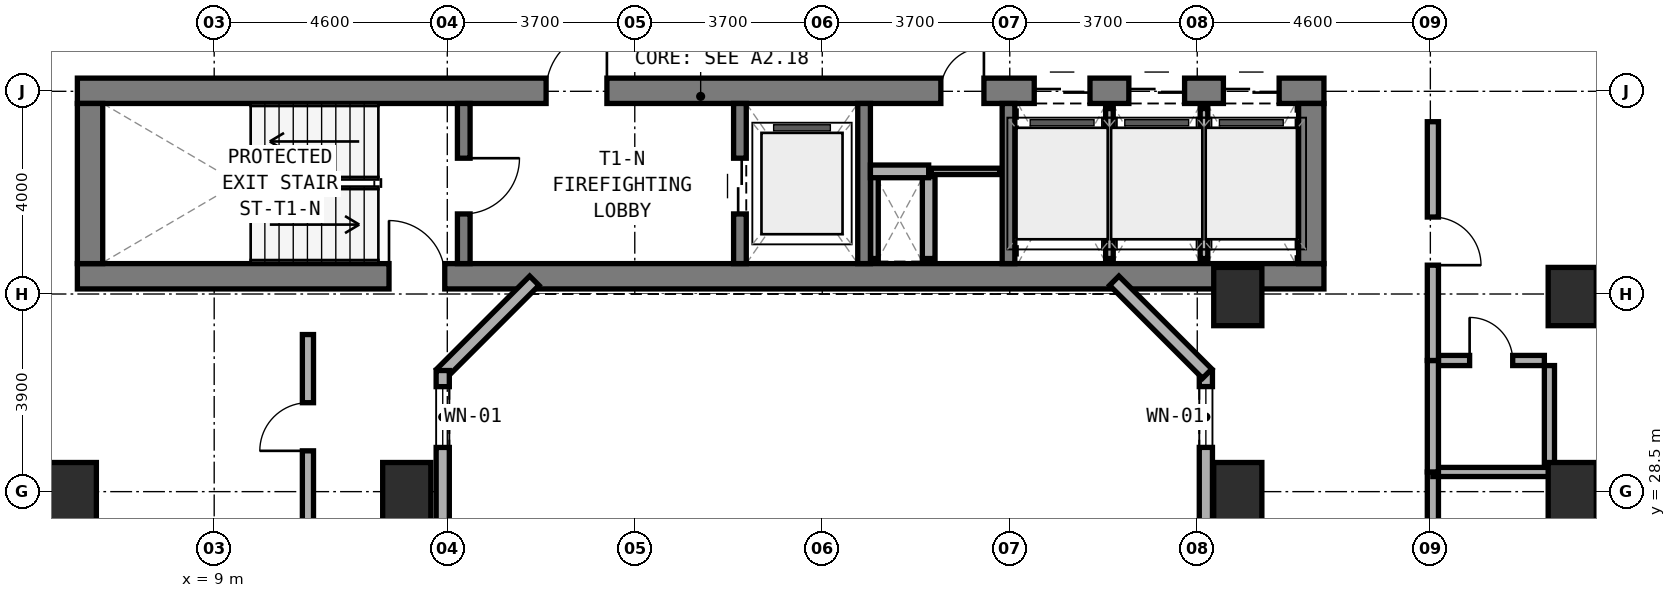
"""IFC4 building model, lengths in metres.
Left out: names, types, materials, properties, quantities, classifications, styles, units other than length and angle.
Written with IfcOpenShell. Run it as: python <this file> out.ifc"""

import sys

from ifc_helpers import new_model, si_unit, direction, frame, frame_2d, origin, origin_2d, place, context, subcontext, project, spatial, rectangle, extrude, element, fill, save


model = new_model("IFC4")
c1 = context("Model", 3, precision=1e-05, world=origin(), true_north=direction((0.0, 1.0)))
c2 = subcontext(c1, "Body", "Model", "MODEL_VIEW")
j1 = project(units=[si_unit("LENGTHUNIT", "METRE"), si_unit("PLANEANGLEUNIT", "RADIAN")], contexts=[c1])
p1 = place(None, origin())
s1 = spatial("IfcSite", under=j1, at=p1, CompositionType="ELEMENT")
p2 = place(p1, origin())
s2 = spatial("IfcBuilding", under=s1, at=p2, CompositionType="ELEMENT")
p3 = place(p2, frame((0.0, 0.0, 73.0)))
s3 = spatial("IfcBuildingStorey", under=s2, at=p3, CompositionType="ELEMENT", Elevation=73.0)
p4 = place(p3, frame((6.3, 32.75, 0.0), z_axis=(0.0, 0.0, 1.0), x_axis=(1.0, 0.0, 0.0)))
e1 = element("IfcWall", 1, at=p4, inside=s3, PredefinedType="SHEAR", context=c2, shape_type="SweptSolid", body=[
    extrude(rectangle(XDim=24.6, YDim=0.5, at=frame_2d((12.3, 0.0))), origin(), (0.0, 0.0, 1.0), 3.5),
])
p5 = place(p4, frame((6.15, 0.0, 0.0)))
e2 = element("IfcOpeningElement", 2, at=p5, cuts=e1, PredefinedType="OPENING", context=c2, shape_type="SweptSolid", body=[
    extrude(rectangle(XDim=1.1, YDim=2.15, at=frame_2d((0.55, 1.075))), frame((0.0, 0.26, 0.0), z_axis=(0.0, -1.0, 0.0), x_axis=(1.0, 0.0, 0.0)), (0.0, 0.0, 1.0), 0.52),
])
p6 = place(p3, frame((6.3, 36.41, 0.0), z_axis=(0.0, 0.0, 1.0), x_axis=(1.0, 0.0, 0.0)))
e3 = element("IfcWall", 3, at=p6, inside=s3, PredefinedType="SHEAR", context=c2, shape_type="SweptSolid", body=[
    extrude(rectangle(XDim=24.6, YDim=0.5, at=frame_2d((12.3, 0.0))), origin(), (0.0, 0.0, 1.0), 3.5),
])
p7 = place(p6, frame((9.25, 0.0, 0.0)))
e4 = element("IfcOpeningElement", 4, at=p7, cuts=e3, PredefinedType="OPENING", context=c2, shape_type="SweptSolid", body=[
    extrude(rectangle(XDim=1.2, YDim=2.15, at=frame_2d((0.6, 1.075))), frame((0.0, 0.26, 0.0), z_axis=(0.0, -1.0, 0.0), x_axis=(1.0, 0.0, 0.0)), (0.0, 0.0, 1.0), 0.52),
])
p8 = place(p6, frame((17.04, 0.0, 0.0)))
e5 = element("IfcOpeningElement", 5, at=p8, cuts=e3, PredefinedType="OPENING", context=c2, shape_type="SweptSolid", body=[
    extrude(rectangle(XDim=0.85, YDim=2.1, at=frame_2d((0.425, 1.05))), frame((0.0, 0.26, 0.0), z_axis=(0.0, -1.0, 0.0), x_axis=(1.0, 0.0, 0.0)), (0.0, 0.0, 1.0), 0.52),
])
p9 = place(p6, frame((18.883, 0.0, 0.0)))
e6 = element("IfcOpeningElement", 6, at=p9, cuts=e3, PredefinedType="OPENING", context=c2, shape_type="SweptSolid", body=[
    extrude(rectangle(XDim=1.1, YDim=2.15, at=frame_2d((0.55, 1.075))), frame((0.0, 0.26, 0.0), z_axis=(0.0, -1.0, 0.0), x_axis=(1.0, 0.0, 0.0)), (0.0, 0.0, 1.0), 0.52),
])
p10 = place(p6, frame((20.75, 0.0, 0.0)))
e7 = element("IfcOpeningElement", 7, at=p10, cuts=e3, PredefinedType="OPENING", context=c2, shape_type="SweptSolid", body=[
    extrude(rectangle(XDim=1.1, YDim=2.15, at=frame_2d((0.55, 1.075))), frame((0.0, 0.26, 0.0), z_axis=(0.0, -1.0, 0.0), x_axis=(1.0, 0.0, 0.0)), (0.0, 0.0, 1.0), 0.52),
])
p11 = place(p6, frame((22.616, 0.0, 0.0)))
e8 = element("IfcOpeningElement", 8, at=p11, cuts=e3, PredefinedType="OPENING", context=c2, shape_type="SweptSolid", body=[
    extrude(rectangle(XDim=1.1, YDim=2.15, at=frame_2d((0.55, 1.075))), frame((0.0, 0.26, 0.0), z_axis=(0.0, -1.0, 0.0), x_axis=(1.0, 0.0, 0.0)), (0.0, 0.0, 1.0), 0.52),
])
for number, where, z_axis, x_axis in (
    (9, (6.55, 33.0, 0.0), (0.0, 0.0, 1.0), (0.0, 1.0, 0.0)),
    (10, (30.65, 33.0, 0.0), (0.0, 0.0, 1.0), (0.0, 1.0, 0.0)),
):
    element("IfcWall", number, at=place(p3, frame(where, z_axis=z_axis, x_axis=x_axis)), inside=s3, PredefinedType="SHEAR", context=c2, shape_type="SweptSolid", body=[
        extrude(rectangle(XDim=3.16, YDim=0.5, at=frame_2d((1.58, 0.0))), origin(), (0.0, 0.0, 1.0), 3.5),
    ])
p12 = place(p3, frame((13.925, 33.0, 0.0), z_axis=(0.0, 0.0, 1.0), x_axis=(0.0, 1.0, 0.0)))
e11 = element("IfcWall", 11, at=p12, inside=s3, PredefinedType="STANDARD", context=c2, shape_type="SweptSolid", body=[
    extrude(rectangle(XDim=3.16, YDim=0.25, at=frame_2d((1.58, 0.0))), origin(), (0.0, 0.0, 1.0), 3.22),
])
p13 = place(p12, frame((0.98, 0.0, 0.0)))
e12 = element("IfcOpeningElement", 12, at=p13, cuts=e11, PredefinedType="OPENING", context=c2, shape_type="SweptSolid", body=[
    extrude(rectangle(XDim=1.1, YDim=2.15, at=frame_2d((0.55, 1.075))), frame((0.0, 0.135, 0.0), z_axis=(0.0, -1.0, 0.0), x_axis=(1.0, 0.0, 0.0)), (0.0, 0.0, 1.0), 0.27),
])
p14 = place(p3, frame((19.375, 33.0, 0.0), z_axis=(0.0, 0.0, 1.0), x_axis=(0.0, 1.0, 0.0)))
e13 = element("IfcWall", 13, at=p14, inside=s3, PredefinedType="STANDARD", context=c2, shape_type="SweptSolid", body=[
    extrude(rectangle(XDim=3.16, YDim=0.25, at=frame_2d((1.58, 0.0))), origin(), (0.0, 0.0, 1.0), 3.22),
])
p15 = place(p14, frame((0.98, 0.0, 0.0)))
e14 = element("IfcOpeningElement", 14, at=p15, cuts=e13, PredefinedType="OPENING", context=c2, shape_type="SweptSolid", body=[
    extrude(rectangle(XDim=1.1, YDim=2.15, at=frame_2d((0.55, 1.075))), frame((0.0, 0.135, 0.0), z_axis=(0.0, -1.0, 0.0), x_axis=(1.0, 0.0, 0.0)), (0.0, 0.0, 1.0), 0.27),
])
for number, where, z_axis, x_axis in (
    (15, (21.825, 33.0, 0.0), (0.0, 0.0, 1.0), (0.0, 1.0, 0.0)),
    (16, (24.675, 33.0, 0.0), (0.0, 0.0, 1.0), (0.0, 1.0, 0.0)),
):
    element("IfcWall", number, at=place(p3, frame(where, z_axis=z_axis, x_axis=x_axis)), inside=s3, PredefinedType="STANDARD", context=c2, shape_type="SweptSolid", body=[
        extrude(rectangle(XDim=3.16, YDim=0.25, at=frame_2d((1.58, 0.0))), origin(), (0.0, 0.0, 1.0), 3.22),
    ])
for number, where, z_axis, x_axis in (
    (17, (6.2, 28.5, 0.0), (0.0, 0.0, 1.0), (1.0, 0.0, 0.0)),
    (18, (35.8, 28.5, 0.0), (0.0, 0.0, 1.0), (1.0, 0.0, 0.0)),
    (19, (35.8, 32.35, 0.0), (0.0, 0.0, 1.0), (1.0, 0.0, 0.0)),
    (20, (12.8, 28.5, 0.0), (0.0, 0.0, 1.0), (1.0, 0.0, 0.0)),
    (21, (29.2, 32.35, 0.0), (0.0, 0.0, 1.0), (1.0, 0.0, 0.0)),
    (22, (29.2, 28.5, 0.0), (0.0, 0.0, 1.0), (1.0, 0.0, 0.0)),
):
    element("IfcColumn", number, at=place(p3, frame(where, z_axis=z_axis, x_axis=x_axis)), inside=s3, PredefinedType="COLUMN", context=c2, shape_type="SweptSolid", body=[
        extrude(rectangle(XDim=0.95, YDim=1.15, at=origin_2d()), origin(), (0.0, 0.0, 1.0), 3.5),
    ])
p16 = place(p3, frame((28.57, 19.11, 0.0), z_axis=(0.0, 0.0, 1.0), x_axis=(0.0, 1.0, 0.0)))
e23 = element("IfcWall", 23, at=p16, inside=s3, PredefinedType="STANDARD", context=c2, shape_type="SweptSolid", body=[
    extrude(rectangle(XDim=11.78, YDim=0.26, at=frame_2d((5.89, 0.0))), origin(), (0.0, 0.0, 1.0), 3.22),
])
p17 = place(p16, frame((0.318, 0.0, 0.85)))
e24 = element("IfcOpeningElement", 24, at=p17, cuts=e23, PredefinedType="OPENING", context=c2, shape_type="SweptSolid", body=[
    extrude(rectangle(XDim=1.2, YDim=1.5, at=frame_2d((0.6, 0.75))), frame((0.0, 0.14, 0.0), z_axis=(0.0, -1.0, 0.0), x_axis=(1.0, 0.0, 0.0)), (0.0, 0.0, 1.0), 0.28),
])
p18 = place(p16, frame((4.99, 0.0, 0.85)))
e25 = element("IfcOpeningElement", 25, at=p18, cuts=e23, PredefinedType="OPENING", context=c2, shape_type="SweptSolid", body=[
    extrude(rectangle(XDim=1.8, YDim=1.5, at=frame_2d((0.9, 0.75))), frame((0.0, 0.14, 0.0), z_axis=(0.0, -1.0, 0.0), x_axis=(1.0, 0.0, 0.0)), (0.0, 0.0, 1.0), 0.28),
])
p19 = place(p16, frame((10.263, 0.0, 0.85)))
e26 = element("IfcOpeningElement", 26, at=p19, cuts=e23, PredefinedType="OPENING", context=c2, shape_type="SweptSolid", body=[
    extrude(rectangle(XDim=1.2, YDim=1.5, at=frame_2d((0.6, 0.75))), frame((0.0, 0.14, 0.0), z_axis=(0.0, -1.0, 0.0), x_axis=(1.0, 0.0, 0.0)), (0.0, 0.0, 1.0), 0.28),
])
p20 = place(p3, frame((28.596, 30.828, 0.0), z_axis=(0.0, 0.0, 1.0), x_axis=(-0.707059717605, 0.707153841636, 0.0)))
e27 = element("IfcWall", 27, at=p20, inside=s3, PredefinedType="STANDARD", context=c2, shape_type="SweptSolid", body=[
    extrude(rectangle(XDim=2.594, YDim=0.26, at=frame_2d((1.297, 0.0))), origin(), (0.0, 0.0, 1.0), 3.22),
])
p21 = place(p3, frame((15.318, 32.662, 0.0), z_axis=(0.0, 0.0, 1.0), x_axis=(-0.707106781187, -0.707106781187, 0.0)))
e28 = element("IfcWall", 28, at=p21, inside=s3, PredefinedType="STANDARD", context=c2, shape_type="SweptSolid", body=[
    extrude(rectangle(XDim=2.594, YDim=0.26, at=frame_2d((1.297, 0.0))), origin(), (0.0, 0.0, 1.0), 3.22),
])
p22 = place(p3, frame((13.51, 30.89, 0.0), z_axis=(0.0, 0.0, 1.0), x_axis=(0.0, -1.0, 0.0)))
e29 = element("IfcWall", 29, at=p22, inside=s3, PredefinedType="STANDARD", context=c2, shape_type="SweptSolid", body=[
    extrude(rectangle(XDim=11.78, YDim=0.26, at=frame_2d((5.89, 0.0))), origin(), (0.0, 0.0, 1.0), 3.22),
])
p23 = place(p22, frame((0.318, 0.0, 0.85)))
e30 = element("IfcOpeningElement", 30, at=p23, cuts=e29, PredefinedType="OPENING", context=c2, shape_type="SweptSolid", body=[
    extrude(rectangle(XDim=1.2, YDim=1.5, at=frame_2d((0.6, 0.75))), frame((0.0, 0.14, 0.0), z_axis=(0.0, -1.0, 0.0), x_axis=(1.0, 0.0, 0.0)), (0.0, 0.0, 1.0), 0.28),
])
p24 = place(p22, frame((4.99, 0.0, 0.85)))
e31 = element("IfcOpeningElement", 31, at=p24, cuts=e29, PredefinedType="OPENING", context=c2, shape_type="SweptSolid", body=[
    extrude(rectangle(XDim=1.8, YDim=1.5, at=frame_2d((0.9, 0.75))), frame((0.0, 0.14, 0.0), z_axis=(0.0, -1.0, 0.0), x_axis=(1.0, 0.0, 0.0)), (0.0, 0.0, 1.0), 0.28),
])
p25 = place(p22, frame((10.263, 0.0, 0.85)))
e32 = element("IfcOpeningElement", 32, at=p25, cuts=e29, PredefinedType="OPENING", context=c2, shape_type="SweptSolid", body=[
    extrude(rectangle(XDim=1.2, YDim=1.5, at=frame_2d((0.6, 0.75))), frame((0.0, 0.14, 0.0), z_axis=(0.0, -1.0, 0.0), x_axis=(1.0, 0.0, 0.0)), (0.0, 0.0, 1.0), 0.28),
])
p26 = place(p3, frame((22.03, 33.1, 0.0), z_axis=(0.0, 0.0, 1.0), x_axis=(0.0, 1.0, 0.0)))
e33 = element("IfcWall", 33, at=p26, inside=s3, PredefinedType="PARTITIONING", context=c2, shape_type="SweptSolid", body=[
    extrude(rectangle(XDim=1.62, YDim=0.15, at=frame_2d((0.81, 0.0))), origin(), (0.0, 0.0, 1.0), 3.22),
])
p27 = place(p3, frame((23.1, 33.1, 0.0), z_axis=(0.0, 0.0, 1.0), x_axis=(0.0, 1.0, 0.0)))
e34 = element("IfcWall", 34, at=p27, inside=s3, PredefinedType="SOLIDWALL", context=c2, shape_type="SweptSolid", body=[
    extrude(rectangle(XDim=1.62, YDim=0.25, at=frame_2d((0.81, 0.0))), origin(), (0.0, 0.0, 1.0), 3.22),
])
p28 = place(p3, frame((21.95, 34.82, 0.0), z_axis=(0.0, 0.0, 1.0), x_axis=(1.0, 0.0, 0.0)))
e35 = element("IfcWall", 35, at=p28, inside=s3, PredefinedType="SOLIDWALL", context=c2, shape_type="SweptSolid", body=[
    extrude(rectangle(XDim=1.15, YDim=0.25, at=frame_2d((0.575, 0.0))), origin(), (0.0, 0.0, 1.0), 3.22),
])
p29 = place(p3, frame((23.15, 34.82, 0.0), z_axis=(0.0, 0.0, 1.0), x_axis=(1.0, 0.0, 0.0)))
e36 = element("IfcWall", 36, at=p29, inside=s3, PredefinedType="PARTITIONING", context=c2, shape_type="SweptSolid", body=[
    extrude(rectangle(XDim=1.35, YDim=0.125, at=frame_2d((0.675, 0.0))), origin(), (0.0, 0.0, 1.0), 3.22),
])
p30 = place(p3, frame((26.667, 33.1, 0.0), z_axis=(0.0, 0.0, 1.0), x_axis=(0.0, 1.0, 0.0)))
e37 = element("IfcWall", 37, at=p30, inside=s3, PredefinedType="PARTITIONING", context=c2, shape_type="SweptSolid", body=[
    extrude(rectangle(XDim=2.96, YDim=0.15, at=frame_2d((1.48, 0.0))), origin(), (0.0, 0.0, 1.0), 3.22),
])
p31 = place(p3, frame((28.533, 33.1, 0.0), z_axis=(0.0, 0.0, 1.0), x_axis=(0.0, 1.0, 0.0)))
e38 = element("IfcWall", 38, at=p31, inside=s3, PredefinedType="PARTITIONING", context=c2, shape_type="SweptSolid", body=[
    extrude(rectangle(XDim=2.96, YDim=0.15, at=frame_2d((1.48, 0.0))), origin(), (0.0, 0.0, 1.0), 2.495),
])
p32 = place(p3, frame((10.85, 25.66, 0.0), z_axis=(0.0, 0.0, 1.0), x_axis=(0.0, 1.0, 0.0)))
e39 = element("IfcWall", 39, at=p32, inside=s3, PredefinedType="SOLIDWALL", context=c2, shape_type="SweptSolid", body=[
    extrude(rectangle(XDim=5.94, YDim=0.22, at=frame_2d((2.97, 0.0))), origin(), (0.0, 0.0, 1.0), 2.495),
])
p33 = place(p32, frame((3.645, 0.0, 0.0)))
e40 = element("IfcOpeningElement", 40, at=p33, cuts=e39, PredefinedType="OPENING", context=c2, shape_type="SweptSolid", body=[
    extrude(rectangle(XDim=0.95, YDim=2.1, at=frame_2d((0.475, 1.05))), frame((0.0, 0.12, 0.0), z_axis=(0.0, -1.0, 0.0), x_axis=(1.0, 0.0, 0.0)), (0.0, 0.0, 1.0), 0.24),
])
p34 = place(p3, frame((33.05, 23.744, 0.0), z_axis=(0.0, 0.0, 1.0), x_axis=(0.0, 1.0, 0.0)))
e41 = element("IfcWall", 41, at=p34, inside=s3, PredefinedType="SOLIDWALL", context=c2, shape_type="SweptSolid", body=[
    extrude(rectangle(XDim=5.144, YDim=0.22, at=frame_2d((2.572, 0.0))), origin(), (0.0, 0.0, 1.0), 2.495),
])
p35 = place(p34, frame((2.097, 0.0, 0.0)))
e42 = element("IfcOpeningElement", 42, at=p35, cuts=e41, PredefinedType="OPENING", context=c2, shape_type="SweptSolid", body=[
    extrude(rectangle(XDim=0.95, YDim=2.1, at=frame_2d((0.475, 1.05))), frame((0.0, 0.12, 0.0), z_axis=(0.0, -1.0, 0.0), x_axis=(1.0, 0.0, 0.0)), (0.0, 0.0, 1.0), 0.24),
])
p36 = place(p3, frame((33.05, 28.888, 0.0), z_axis=(0.0, 0.0, 1.0), x_axis=(1.0, 0.0, 0.0)))
e43 = element("IfcWall", 43, at=p36, inside=s3, PredefinedType="SOLIDWALL", context=c2, shape_type="SweptSolid", body=[
    extrude(rectangle(XDim=8.89, YDim=0.18, at=frame_2d((4.445, 0.0))), origin(), (0.0, 0.0, 1.0), 2.745),
])
p37 = place(p3, frame((33.15, 31.088, 0.0), z_axis=(0.0, 0.0, 1.0), x_axis=(1.0, 0.0, 0.0)))
e44 = element("IfcWall", 44, at=p37, inside=s3, PredefinedType="PLUMBINGWALL", context=c2, shape_type="SweptSolid", body=[
    extrude(rectangle(XDim=2.1, YDim=0.2, at=frame_2d((1.05, 0.0))), origin(), (0.0, 0.0, 1.0), 3.22),
])
p38 = place(p37, frame((0.625, 0.0, 0.0)))
e45 = element("IfcOpeningElement", 45, at=p38, cuts=e44, PredefinedType="OPENING", context=c2, shape_type="SweptSolid", body=[
    extrude(rectangle(XDim=0.85, YDim=2.1, at=frame_2d((0.425, 1.05))), frame((0.0, 0.11, 0.0), z_axis=(0.0, -1.0, 0.0), x_axis=(1.0, 0.0, 0.0)), (0.0, 0.0, 1.0), 0.22),
])
p39 = place(p3, frame((35.35, 28.988, 0.0), z_axis=(0.0, 0.0, 1.0), x_axis=(0.0, 1.0, 0.0)))
e46 = element("IfcWall", 46, at=p39, inside=s3, PredefinedType="PLUMBINGWALL", context=c2, shape_type="SweptSolid", body=[
    extrude(rectangle(XDim=2.0, YDim=0.2, at=frame_2d((1.0, 0.0))), origin(), (0.0, 0.0, 1.0), 3.22),
])
p40 = place(p3, frame((33.05, 28.888, 0.0), z_axis=(0.0, 0.0, 1.0), x_axis=(0.0, 1.0, 0.0)))
e47 = element("IfcWall", 47, at=p40, inside=s3, PredefinedType="SOLIDWALL", context=c2, shape_type="SweptSolid", body=[
    extrude(rectangle(XDim=2.2, YDim=0.22, at=frame_2d((1.1, 0.0))), origin(), (0.0, 0.0, 1.0), 3.22),
])
p41 = place(p3, frame((33.05, 31.088, 0.0), z_axis=(0.0, 0.0, 1.0), x_axis=(0.0, 1.0, 0.0)))
e48 = element("IfcWall", 48, at=p41, inside=s3, PredefinedType="SOLIDWALL", context=c2, shape_type="SweptSolid", body=[
    extrude(rectangle(XDim=4.712, YDim=0.22, at=frame_2d((2.356, 0.0))), origin(), (0.0, 0.0, 1.0), 2.495),
])
p42 = place(p41, frame((1.881, 0.0, 0.0)))
e49 = element("IfcOpeningElement", 49, at=p42, cuts=e48, PredefinedType="OPENING", context=c2, shape_type="SweptSolid", body=[
    extrude(rectangle(XDim=0.95, YDim=2.1, at=frame_2d((0.475, 1.05))), frame((0.0, 0.12, 0.0), z_axis=(0.0, -1.0, 0.0), x_axis=(1.0, 0.0, 0.0)), (0.0, 0.0, 1.0), 0.24),
])
p43 = place(p19, origin())
e50 = element("IfcWindow", 50, at=p43, inside=s3, PartitioningType="SINGLE_PANEL", PredefinedType="WINDOW", context=c2, shape_type="SweptSolid", body=[
    extrude(rectangle(XDim=1.2, YDim=1.5, at=frame_2d((0.6, 0.75))), frame((0.0, 0.03, 0.0), z_axis=(0.0, -1.0, 0.0), x_axis=(1.0, 0.0, 0.0)), (0.0, 0.0, 1.0), 0.06),
])
fill(e26, e50)
p44 = place(p23, origin())
e51 = element("IfcWindow", 51, at=p44, inside=s3, PartitioningType="SINGLE_PANEL", PredefinedType="WINDOW", context=c2, shape_type="SweptSolid", body=[
    extrude(rectangle(XDim=1.2, YDim=1.5, at=frame_2d((0.6, 0.75))), frame((0.0, 0.03, 0.0), z_axis=(0.0, -1.0, 0.0), x_axis=(1.0, 0.0, 0.0)), (0.0, 0.0, 1.0), 0.06),
])
fill(e30, e51)
p45 = place(p13, frame((1.1, 0.0, 0.0), z_axis=(0.0, 0.0, 1.0), x_axis=(-1.0, 0.0, 0.0)))
e52 = element("IfcDoor", 52, at=p45, inside=s3, OperationType="SINGLE_SWING_LEFT", PredefinedType="DOOR", context=c2, shape_type="SweptSolid", body=[
    extrude(rectangle(XDim=1.1, YDim=2.15, at=frame_2d((0.55, 1.075))), frame((0.0, 0.025, 0.0), z_axis=(0.0, -1.0, 0.0), x_axis=(1.0, 0.0, 0.0)), (0.0, 0.0, 1.0), 0.05),
])
fill(e12, e52)
p46 = place(p7, origin())
e53 = element("IfcDoor", 53, at=p46, inside=s3, OperationType="SINGLE_SWING_RIGHT", PredefinedType="DOOR", context=c2, shape_type="SweptSolid", body=[
    extrude(rectangle(XDim=1.2, YDim=2.15, at=frame_2d((0.6, 1.075))), frame((0.0, 0.025, 0.0), z_axis=(0.0, -1.0, 0.0), x_axis=(1.0, 0.0, 0.0)), (0.0, 0.0, 1.0), 0.05),
])
fill(e4, e53)
p47 = place(p15, origin())
e54 = element("IfcDoor", 54, at=p47, inside=s3, OperationType="DOUBLE_DOOR_SLIDING", PredefinedType="DOOR", context=c2, shape_type="SweptSolid", body=[
    extrude(rectangle(XDim=1.1, YDim=2.15, at=frame_2d((0.55, 1.075))), frame((0.0, 0.025, 0.0), z_axis=(0.0, -1.0, 0.0), x_axis=(1.0, 0.0, 0.0)), (0.0, 0.0, 1.0), 0.05),
])
fill(e14, e54)
p48 = place(p8, origin())
e55 = element("IfcDoor", 55, at=p48, inside=s3, OperationType="SINGLE_SWING_RIGHT", PredefinedType="DOOR", context=c2, shape_type="SweptSolid", body=[
    extrude(rectangle(XDim=0.85, YDim=2.1, at=frame_2d((0.425, 1.05))), frame((0.0, 0.025, 0.0), z_axis=(0.0, -1.0, 0.0), x_axis=(1.0, 0.0, 0.0)), (0.0, 0.0, 1.0), 0.05),
])
fill(e5, e55)
p49 = place(p9, origin())
e56 = element("IfcDoor", 56, at=p49, inside=s3, OperationType="DOUBLE_DOOR_SLIDING", PredefinedType="DOOR", context=c2, shape_type="SweptSolid", body=[
    extrude(rectangle(XDim=1.1, YDim=2.15, at=frame_2d((0.55, 1.075))), frame((0.0, 0.025, 0.0), z_axis=(0.0, -1.0, 0.0), x_axis=(1.0, 0.0, 0.0)), (0.0, 0.0, 1.0), 0.05),
])
fill(e6, e56)
p50 = place(p10, origin())
e57 = element("IfcDoor", 57, at=p50, inside=s3, OperationType="DOUBLE_DOOR_SLIDING", PredefinedType="DOOR", context=c2, shape_type="SweptSolid", body=[
    extrude(rectangle(XDim=1.1, YDim=2.15, at=frame_2d((0.55, 1.075))), frame((0.0, 0.025, 0.0), z_axis=(0.0, -1.0, 0.0), x_axis=(1.0, 0.0, 0.0)), (0.0, 0.0, 1.0), 0.05),
])
fill(e7, e57)
p51 = place(p11, origin())
e58 = element("IfcDoor", 58, at=p51, inside=s3, OperationType="DOUBLE_DOOR_SLIDING", PredefinedType="DOOR", context=c2, shape_type="SweptSolid", body=[
    extrude(rectangle(XDim=1.1, YDim=2.15, at=frame_2d((0.55, 1.075))), frame((0.0, 0.025, 0.0), z_axis=(0.0, -1.0, 0.0), x_axis=(1.0, 0.0, 0.0)), (0.0, 0.0, 1.0), 0.05),
])
fill(e8, e58)
p52 = place(p5, origin())
e59 = element("IfcDoor", 59, at=p52, inside=s3, OperationType="SINGLE_SWING_LEFT", PredefinedType="DOOR", context=c2, shape_type="SweptSolid", body=[
    extrude(rectangle(XDim=1.1, YDim=2.15, at=frame_2d((0.55, 1.075))), frame((0.0, 0.025, 0.0), z_axis=(0.0, -1.0, 0.0), x_axis=(1.0, 0.0, 0.0)), (0.0, 0.0, 1.0), 0.05),
])
fill(e2, e59)
p53 = place(p33, origin())
e60 = element("IfcDoor", 60, at=p53, inside=s3, OperationType="SINGLE_SWING_LEFT", PredefinedType="DOOR", context=c2, shape_type="SweptSolid", body=[
    extrude(rectangle(XDim=0.95, YDim=2.1, at=frame_2d((0.475, 1.05))), frame((0.0, 0.025, 0.0), z_axis=(0.0, -1.0, 0.0), x_axis=(1.0, 0.0, 0.0)), (0.0, 0.0, 1.0), 0.05),
])
fill(e40, e60)
p54 = place(p38, origin())
e61 = element("IfcDoor", 61, at=p54, inside=s3, OperationType="SINGLE_SWING_LEFT", PredefinedType="DOOR", context=c2, shape_type="SweptSolid", body=[
    extrude(rectangle(XDim=0.85, YDim=2.1, at=frame_2d((0.425, 1.05))), frame((0.0, 0.025, 0.0), z_axis=(0.0, -1.0, 0.0), x_axis=(1.0, 0.0, 0.0)), (0.0, 0.0, 1.0), 0.05),
])
fill(e45, e61)
p55 = place(p42, frame((0.95, 0.0, 0.0), z_axis=(0.0, 0.0, 1.0), x_axis=(-1.0, 0.0, 0.0)))
e62 = element("IfcDoor", 62, at=p55, inside=s3, OperationType="SINGLE_SWING_RIGHT", PredefinedType="DOOR", context=c2, shape_type="SweptSolid", body=[
    extrude(rectangle(XDim=0.95, YDim=2.1, at=frame_2d((0.475, 1.05))), frame((0.0, 0.025, 0.0), z_axis=(0.0, -1.0, 0.0), x_axis=(1.0, 0.0, 0.0)), (0.0, 0.0, 1.0), 0.05),
])
fill(e49, e62)
save(model, sys.argv[1])
